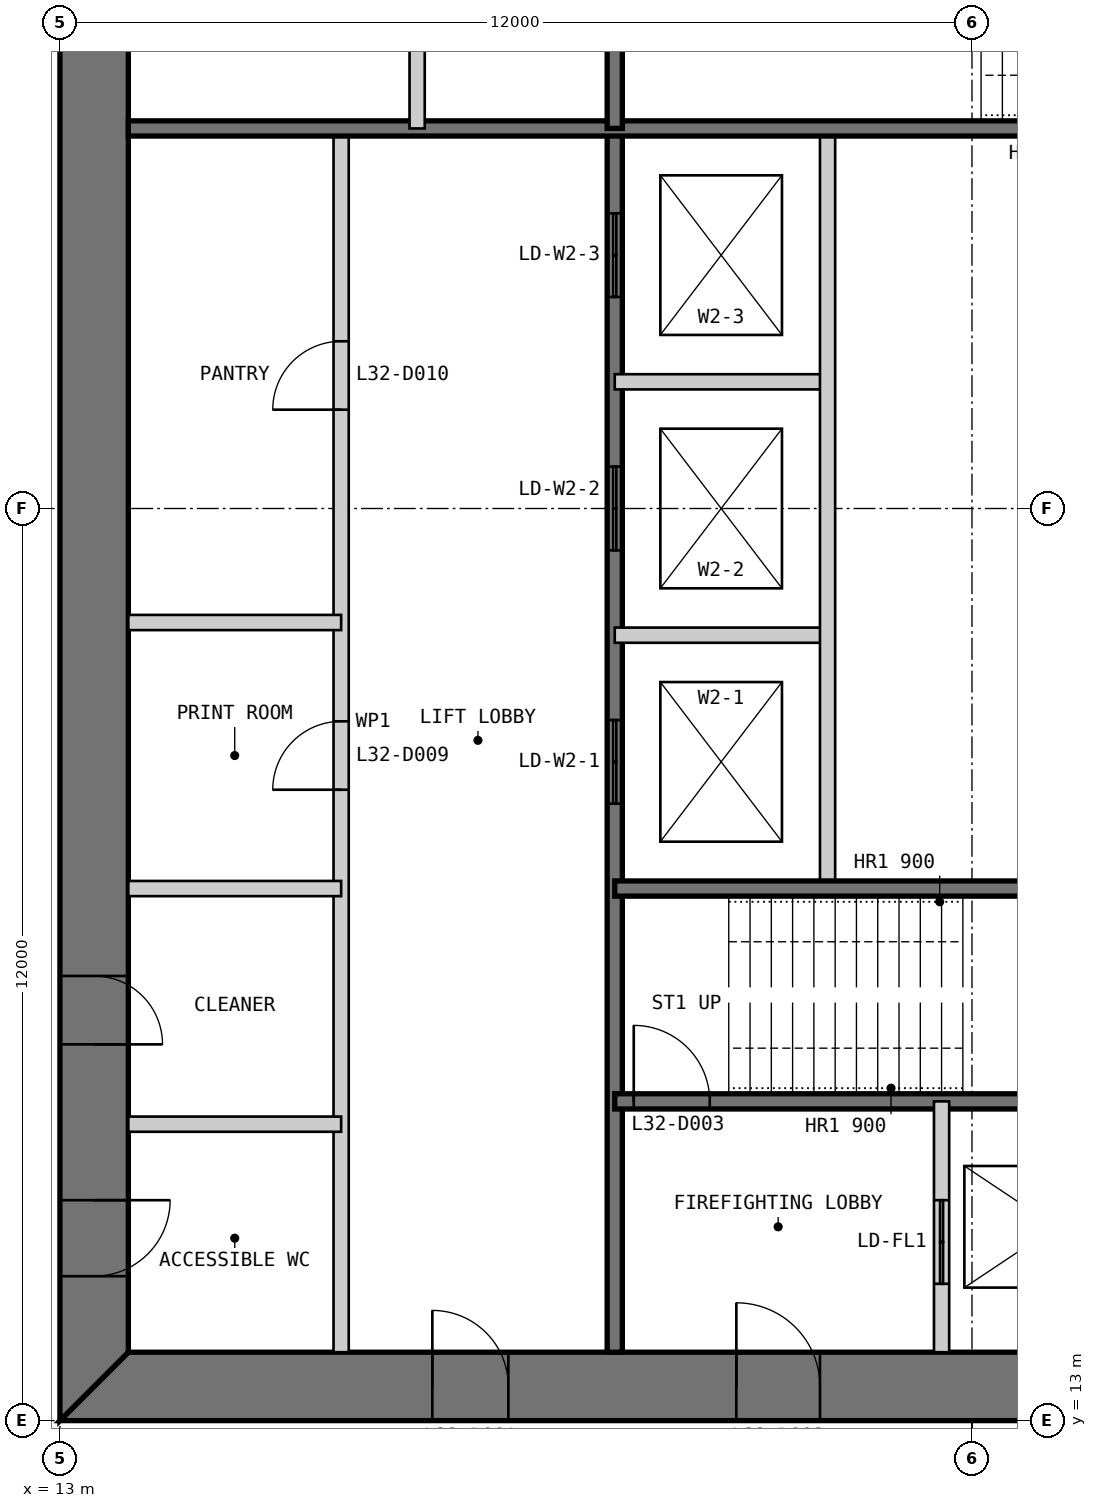
"""IFC4 building model, lengths in metres.
Left out: names, types, materials, properties, quantities, classifications, styles, units other than length and angle.
Written with IfcOpenShell. Run it as: python <this file> out.ifc"""

import sys

from ifc_helpers import new_model, si_unit, direction, frame, frame_2d, origin, place, context, subcontext, project, spatial, polyline, rectangle, outline, extrude, element, fill, save


model = new_model("IFC4")
c1 = context("Model", 3, precision=1e-05, world=origin(), true_north=direction((0.0, 1.0)))
c2 = subcontext(c1, "Body", "Model", "MODEL_VIEW")
j1 = project(units=[si_unit("LENGTHUNIT", "METRE"), si_unit("PLANEANGLEUNIT", "RADIAN")], contexts=[c1])
p1 = place(None, origin())
s1 = spatial("IfcSite", under=j1, at=p1, CompositionType="ELEMENT")
p2 = place(p1, origin())
s2 = spatial("IfcBuilding", under=s1, at=p2, CompositionType="ELEMENT")
p3 = place(p2, frame((0.0, 0.0, 138.4)))
s3 = spatial("IfcBuildingStorey", under=s2, at=p3, CompositionType="ELEMENT", Elevation=138.4)
p4 = place(p3, frame((13.0, 13.45, 0.0), z_axis=(0.0, 0.0, 1.0), x_axis=(1.0, 0.0, 0.0)))
e1 = element("IfcWall", 1, at=p4, inside=s3, PredefinedType="SHEAR", context=c2, shape_type="SweptSolid", body=[
    extrude(outline(polyline([(0.0, -0.45), (24.0, -0.45), (23.1, 0.45), (0.9, 0.45), (0.0, -0.45)])), origin(), (0.0, 0.0, 1.0), 4.0),
])
p5 = place(p4, frame((4.9, 0.0, 0.0)))
e2 = element("IfcOpeningElement", 2, at=p5, cuts=e1, PredefinedType="OPENING", context=c2, shape_type="SweptSolid", body=[
    extrude(rectangle(XDim=1.0, YDim=2.2, at=frame_2d((0.5, 1.1))), frame((0.0, 0.46, 0.0), z_axis=(0.0, -1.0, 0.0), x_axis=(1.0, 0.0, 0.0)), (0.0, 0.0, 1.0), 0.92),
])
p6 = place(p4, frame((8.9, 0.0, 0.0)))
e3 = element("IfcOpeningElement", 3, at=p6, cuts=e1, PredefinedType="OPENING", context=c2, shape_type="SweptSolid", body=[
    extrude(rectangle(XDim=1.1, YDim=2.2, at=frame_2d((0.55, 1.1))), frame((0.0, 0.46, 0.0), z_axis=(0.0, -1.0, 0.0), x_axis=(1.0, 0.0, 0.0)), (0.0, 0.0, 1.0), 0.92),
])
p7 = place(p4, frame((15.05, 0.0, 0.0)))
e4 = element("IfcOpeningElement", 4, at=p7, cuts=e1, PredefinedType="OPENING", context=c2, shape_type="SweptSolid", body=[
    extrude(rectangle(XDim=0.9, YDim=2.2, at=frame_2d((0.45, 1.1))), frame((0.0, 0.46, 0.0), z_axis=(0.0, -1.0, 0.0), x_axis=(1.0, 0.0, 0.0)), (0.0, 0.0, 1.0), 0.92),
])
p8 = place(p4, frame((17.9, 0.0, 0.0)))
e5 = element("IfcOpeningElement", 5, at=p8, cuts=e1, PredefinedType="OPENING", context=c2, shape_type="SweptSolid", body=[
    extrude(rectangle(XDim=1.0, YDim=2.2, at=frame_2d((0.5, 1.1))), frame((0.0, 0.46, 0.0), z_axis=(0.0, -1.0, 0.0), x_axis=(1.0, 0.0, 0.0)), (0.0, 0.0, 1.0), 0.92),
])
p9 = place(p4, frame((21.4, 0.0, 0.0)))
e6 = element("IfcOpeningElement", 6, at=p9, cuts=e1, PredefinedType="OPENING", context=c2, shape_type="SweptSolid", body=[
    extrude(rectangle(XDim=1.0, YDim=2.2, at=frame_2d((0.5, 1.1))), frame((0.0, 0.46, 0.0), z_axis=(0.0, -1.0, 0.0), x_axis=(1.0, 0.0, 0.0)), (0.0, 0.0, 1.0), 0.92),
])
p10 = place(p3, frame((13.45, 36.1, 0.0), z_axis=(0.0, 0.0, 1.0), x_axis=(0.0, -1.0, 0.0)))
e7 = element("IfcWall", 7, at=p10, inside=s3, PredefinedType="SHEAR", context=c2, shape_type="SweptSolid", body=[
    extrude(outline(polyline([(-0.9, -0.45), (23.1, -0.45), (22.2, 0.45), (0.0, 0.45), (-0.9, -0.45)])), origin(), (0.0, 0.0, 1.0), 4.0),
])
p11 = place(p10, frame((20.2, 0.0, 0.0)))
e8 = element("IfcOpeningElement", 8, at=p11, cuts=e7, PredefinedType="OPENING", context=c2, shape_type="SweptSolid", body=[
    extrude(rectangle(XDim=1.0, YDim=2.2, at=frame_2d((0.5, 1.1))), frame((0.0, 0.46, 0.0), z_axis=(0.0, -1.0, 0.0), x_axis=(1.0, 0.0, 0.0)), (0.0, 0.0, 1.0), 0.92),
])
p12 = place(p10, frame((17.25, 0.0, 0.0)))
e9 = element("IfcOpeningElement", 9, at=p12, cuts=e7, PredefinedType="OPENING", context=c2, shape_type="SweptSolid", body=[
    extrude(rectangle(XDim=0.9, YDim=2.2, at=frame_2d((0.45, 1.1))), frame((0.0, 0.46, 0.0), z_axis=(0.0, -1.0, 0.0), x_axis=(1.0, 0.0, 0.0)), (0.0, 0.0, 1.0), 0.92),
])
p13 = place(p3, frame((16.7, 13.9, 0.0), z_axis=(0.0, 0.0, 1.0), x_axis=(0.0, 1.0, 0.0)))
e10 = element("IfcWall", 10, at=p13, inside=s3, PredefinedType="PARTITIONING", context=c2, shape_type="SweptSolid", body=[
    extrude(rectangle(XDim=16.1, YDim=0.2, at=frame_2d((8.05, 0.0))), origin(), (0.0, 0.0, 1.0), 3.8),
])
p14 = place(p13, frame((7.4, 0.0, 0.0)))
e11 = element("IfcOpeningElement", 11, at=p14, cuts=e10, PredefinedType="OPENING", context=c2, shape_type="SweptSolid", body=[
    extrude(rectangle(XDim=0.9, YDim=2.2, at=frame_2d((0.45, 1.1))), frame((0.0, 0.11, 0.0), z_axis=(0.0, -1.0, 0.0), x_axis=(1.0, 0.0, 0.0)), (0.0, 0.0, 1.0), 0.22),
])
p15 = place(p13, frame((12.4, 0.0, 0.0)))
e12 = element("IfcOpeningElement", 12, at=p15, cuts=e10, PredefinedType="OPENING", context=c2, shape_type="SweptSolid", body=[
    extrude(rectangle(XDim=0.9, YDim=2.2, at=frame_2d((0.45, 1.1))), frame((0.0, 0.11, 0.0), z_axis=(0.0, -1.0, 0.0), x_axis=(1.0, 0.0, 0.0)), (0.0, 0.0, 1.0), 0.22),
])
p16 = place(p3, frame((20.3, 13.9, 0.0), z_axis=(0.0, 0.0, 1.0), x_axis=(0.0, 1.0, 0.0)))
e13 = element("IfcWall", 13, at=p16, inside=s3, PredefinedType="SOLIDWALL", context=c2, shape_type="SweptSolid", body=[
    extrude(rectangle(XDim=16.1, YDim=0.2, at=frame_2d((8.05, 0.0))), origin(), (0.0, 0.0, 1.0), 3.8),
])
p17 = place(p16, frame((7.217, 0.0, 0.0)))
e14 = element("IfcOpeningElement", 14, at=p17, cuts=e13, PredefinedType="OPENING", context=c2, shape_type="SweptSolid", body=[
    extrude(rectangle(XDim=1.1, YDim=2.2, at=frame_2d((0.55, 1.1))), frame((0.0, 0.11, 0.0), z_axis=(0.0, -1.0, 0.0), x_axis=(1.0, 0.0, 0.0)), (0.0, 0.0, 1.0), 0.22),
])
p18 = place(p16, frame((10.55, 0.0, 0.0)))
e15 = element("IfcOpeningElement", 15, at=p18, cuts=e13, PredefinedType="OPENING", context=c2, shape_type="SweptSolid", body=[
    extrude(rectangle(XDim=1.1, YDim=2.2, at=frame_2d((0.55, 1.1))), frame((0.0, 0.11, 0.0), z_axis=(0.0, -1.0, 0.0), x_axis=(1.0, 0.0, 0.0)), (0.0, 0.0, 1.0), 0.22),
])
p19 = place(p16, frame((13.883, 0.0, 0.0)))
e16 = element("IfcOpeningElement", 16, at=p19, cuts=e13, PredefinedType="OPENING", context=c2, shape_type="SweptSolid", body=[
    extrude(rectangle(XDim=1.1, YDim=2.2, at=frame_2d((0.55, 1.1))), frame((0.0, 0.11, 0.0), z_axis=(0.0, -1.0, 0.0), x_axis=(1.0, 0.0, 0.0)), (0.0, 0.0, 1.0), 0.22),
])
for number, where, z_axis, x_axis in (
    (17, (20.3, 23.333, 0.0), (0.0, 0.0, 1.0), (1.0, 0.0, 0.0)),
    (18, (20.3, 26.667, 0.0), (0.0, 0.0, 1.0), (1.0, 0.0, 0.0)),
):
    element("IfcWall", number, at=place(p3, frame(where, z_axis=z_axis, x_axis=x_axis)), inside=s3, PredefinedType="PARTITIONING", context=c2, shape_type="SweptSolid", body=[
        extrude(rectangle(XDim=2.8, YDim=0.2, at=frame_2d((1.4, 0.0))), origin(), (0.0, 0.0, 1.0), 3.8),
    ])
p20 = place(p3, frame((23.1, 20.0, 0.0), z_axis=(0.0, 0.0, 1.0), x_axis=(0.0, 1.0, 0.0)))
e19 = element("IfcWall", 19, at=p20, inside=s3, PredefinedType="PARTITIONING", context=c2, shape_type="SweptSolid", body=[
    extrude(rectangle(XDim=10.0, YDim=0.2, at=frame_2d((5.0, 0.0))), origin(), (0.0, 0.0, 1.0), 3.8),
])
p21 = place(p3, frame((20.3, 17.2, 0.0), z_axis=(0.0, 0.0, 1.0), x_axis=(1.0, 0.0, 0.0)))
e20 = element("IfcWall", 20, at=p21, inside=s3, PredefinedType="SOLIDWALL", context=c2, shape_type="SweptSolid", body=[
    extrude(rectangle(XDim=9.4, YDim=0.2, at=frame_2d((4.7, 0.0))), origin(), (0.0, 0.0, 1.0), 3.8),
])
p22 = place(p21, frame((0.25, 0.0, 0.0)))
e21 = element("IfcOpeningElement", 21, at=p22, cuts=e20, PredefinedType="OPENING", context=c2, shape_type="SweptSolid", body=[
    extrude(rectangle(XDim=1.0, YDim=2.2, at=frame_2d((0.5, 1.1))), frame((0.0, 0.11, 0.0), z_axis=(0.0, -1.0, 0.0), x_axis=(1.0, 0.0, 0.0)), (0.0, 0.0, 1.0), 0.22),
])
p23 = place(p3, frame((20.3, 20.0, 0.0), z_axis=(0.0, 0.0, 1.0), x_axis=(1.0, 0.0, 0.0)))
e22 = element("IfcWall", 22, at=p23, inside=s3, PredefinedType="SOLIDWALL", context=c2, shape_type="SweptSolid", body=[
    extrude(rectangle(XDim=15.8, YDim=0.2, at=frame_2d((7.9, 0.0))), origin(), (0.0, 0.0, 1.0), 3.8),
])
p24 = place(p3, frame((24.6, 13.9, 0.0), z_axis=(0.0, 0.0, 1.0), x_axis=(0.0, 1.0, 0.0)))
e23 = element("IfcWall", 23, at=p24, inside=s3, PredefinedType="PARTITIONING", context=c2, shape_type="SweptSolid", body=[
    extrude(rectangle(XDim=3.3, YDim=0.2, at=frame_2d((1.65, 0.0))), origin(), (0.0, 0.0, 1.0), 3.8),
])
p25 = place(p24, frame((0.9, 0.0, 0.0)))
e24 = element("IfcOpeningElement", 24, at=p25, cuts=e23, PredefinedType="OPENING", context=c2, shape_type="SweptSolid", body=[
    extrude(rectangle(XDim=1.1, YDim=2.2, at=frame_2d((0.55, 1.1))), frame((0.0, 0.11, 0.0), z_axis=(0.0, -1.0, 0.0), x_axis=(1.0, 0.0, 0.0)), (0.0, 0.0, 1.0), 0.22),
])
for number, where, z_axis, x_axis in (
    (25, (13.9, 16.9, 0.0), (0.0, 0.0, 1.0), (1.0, 0.0, 0.0)),
    (26, (13.9, 20.0, 0.0), (0.0, 0.0, 1.0), (1.0, 0.0, 0.0)),
    (27, (13.9, 23.5, 0.0), (0.0, 0.0, 1.0), (1.0, 0.0, 0.0)),
):
    element("IfcWall", number, at=place(p3, frame(where, z_axis=z_axis, x_axis=x_axis)), inside=s3, PredefinedType="PARTITIONING", context=c2, shape_type="SweptSolid", body=[
        extrude(rectangle(XDim=2.8, YDim=0.2, at=frame_2d((1.4, 0.0))), origin(), (0.0, 0.0, 1.0), 3.8),
    ])
p26 = place(p3, frame((29.7, 30.0, 0.0), z_axis=(0.0, 0.0, 1.0), x_axis=(-1.0, 0.0, 0.0)))
e28 = element("IfcWall", 28, at=p26, inside=s3, PredefinedType="SOLIDWALL", context=c2, shape_type="SweptSolid", body=[
    extrude(rectangle(XDim=15.8, YDim=0.2, at=frame_2d((7.9, 0.0))), origin(), (0.0, 0.0, 1.0), 3.8),
])
p27 = place(p3, frame((20.3, 36.1, 0.0), z_axis=(0.0, 0.0, 1.0), x_axis=(0.0, -1.0, 0.0)))
e29 = element("IfcWall", 29, at=p27, inside=s3, PredefinedType="SOLIDWALL", context=c2, shape_type="SweptSolid", body=[
    extrude(rectangle(XDim=6.1, YDim=0.2, at=frame_2d((3.05, 0.0))), origin(), (0.0, 0.0, 1.0), 3.8),
])
p28 = place(p3, frame((17.7, 36.1, 0.0), z_axis=(0.0, 0.0, 1.0), x_axis=(0.0, -1.0, 0.0)))
e30 = element("IfcWall", 30, at=p28, inside=s3, PredefinedType="PARTITIONING", context=c2, shape_type="SweptSolid", body=[
    extrude(rectangle(XDim=6.1, YDim=0.2, at=frame_2d((3.05, 0.0))), origin(), (0.0, 0.0, 1.0), 3.8),
])
p29 = place(p5, origin())
e31 = element("IfcDoor", 31, at=p29, inside=s3, OperationType="SINGLE_SWING_LEFT", PredefinedType="DOOR", context=c2, shape_type="SweptSolid", body=[
    extrude(rectangle(XDim=1.0, YDim=2.2, at=frame_2d((0.5, 1.1))), frame((0.0, 0.025, 0.0), z_axis=(0.0, -1.0, 0.0), x_axis=(1.0, 0.0, 0.0)), (0.0, 0.0, 1.0), 0.05),
    extrude(outline(polyline([(0.0, 0.0), (0.04, 0.0), (0.04, 2.16), (0.96, 2.16), (0.96, 0.0), (1.0, 0.0), (1.0, 2.2), (0.0, 2.2), (0.0, 0.0)])), frame((0.0, 0.3, 0.0), z_axis=(0.0, -1.0, 0.0), x_axis=(1.0, 0.0, 0.0)), (0.0, 0.0, 1.0), 0.6),
])
fill(e2, e31)
p30 = place(p6, origin())
e32 = element("IfcDoor", 32, at=p30, inside=s3, OperationType="SINGLE_SWING_LEFT", PredefinedType="DOOR", context=c2, shape_type="SweptSolid", body=[
    extrude(rectangle(XDim=1.1, YDim=2.2, at=frame_2d((0.55, 1.1))), frame((0.0, 0.025, 0.0), z_axis=(0.0, -1.0, 0.0), x_axis=(1.0, 0.0, 0.0)), (0.0, 0.0, 1.0), 0.05),
    extrude(outline(polyline([(0.0, 0.0), (0.04, 0.0), (0.04, 2.16), (1.06, 2.16), (1.06, 0.0), (1.1, 0.0), (1.1, 2.2), (0.0, 2.2), (0.0, 0.0)])), frame((0.0, 0.3, 0.0), z_axis=(0.0, -1.0, 0.0), x_axis=(1.0, 0.0, 0.0)), (0.0, 0.0, 1.0), 0.6),
])
fill(e3, e32)
p31 = place(p22, origin())
e33 = element("IfcDoor", 33, at=p31, inside=s3, OperationType="SINGLE_SWING_LEFT", PredefinedType="DOOR", context=c2, shape_type="SweptSolid", body=[
    extrude(rectangle(XDim=1.0, YDim=2.2, at=frame_2d((0.5, 1.1))), frame((0.0, 0.025, 0.0), z_axis=(0.0, -1.0, 0.0), x_axis=(1.0, 0.0, 0.0)), (0.0, 0.0, 1.0), 0.05),
])
fill(e21, e33)
p32 = place(p11, origin())
e34 = element("IfcDoor", 34, at=p32, inside=s3, OperationType="SINGLE_SWING_LEFT", PredefinedType="DOOR", context=c2, shape_type="SweptSolid", body=[
    extrude(rectangle(XDim=1.0, YDim=2.2, at=frame_2d((0.5, 1.1))), frame((0.0, 0.025, 0.0), z_axis=(0.0, -1.0, 0.0), x_axis=(1.0, 0.0, 0.0)), (0.0, 0.0, 1.0), 0.05),
    extrude(outline(polyline([(0.0, 0.0), (0.04, 0.0), (0.04, 2.16), (0.96, 2.16), (0.96, 0.0), (1.0, 0.0), (1.0, 2.2), (0.0, 2.2), (0.0, 0.0)])), frame((0.0, 0.3, 0.0), z_axis=(0.0, -1.0, 0.0), x_axis=(1.0, 0.0, 0.0)), (0.0, 0.0, 1.0), 0.6),
])
fill(e8, e34)
p33 = place(p12, origin())
e35 = element("IfcDoor", 35, at=p33, inside=s3, OperationType="SINGLE_SWING_RIGHT", PredefinedType="DOOR", context=c2, shape_type="SweptSolid", body=[
    extrude(rectangle(XDim=0.9, YDim=2.2, at=frame_2d((0.45, 1.1))), frame((0.0, 0.025, 0.0), z_axis=(0.0, -1.0, 0.0), x_axis=(1.0, 0.0, 0.0)), (0.0, 0.0, 1.0), 0.05),
    extrude(outline(polyline([(0.0, 0.0), (0.04, 0.0), (0.04, 2.16), (0.86, 2.16), (0.86, 0.0), (0.9, 0.0), (0.9, 2.2), (0.0, 2.2), (0.0, 0.0)])), frame((0.0, 0.3, 0.0), z_axis=(0.0, -1.0, 0.0), x_axis=(1.0, 0.0, 0.0)), (0.0, 0.0, 1.0), 0.6),
])
fill(e9, e35)
p34 = place(p14, origin())
e36 = element("IfcDoor", 36, at=p34, inside=s3, OperationType="SINGLE_SWING_LEFT", PredefinedType="DOOR", context=c2, shape_type="SweptSolid", body=[
    extrude(rectangle(XDim=0.9, YDim=2.2, at=frame_2d((0.45, 1.1))), frame((0.0, 0.025, 0.0), z_axis=(0.0, -1.0, 0.0), x_axis=(1.0, 0.0, 0.0)), (0.0, 0.0, 1.0), 0.05),
])
fill(e11, e36)
p35 = place(p15, origin())
e37 = element("IfcDoor", 37, at=p35, inside=s3, OperationType="SINGLE_SWING_LEFT", PredefinedType="DOOR", context=c2, shape_type="SweptSolid", body=[
    extrude(rectangle(XDim=0.9, YDim=2.2, at=frame_2d((0.45, 1.1))), frame((0.0, 0.025, 0.0), z_axis=(0.0, -1.0, 0.0), x_axis=(1.0, 0.0, 0.0)), (0.0, 0.0, 1.0), 0.05),
])
fill(e12, e37)
p36 = place(p25, origin())
e38 = element("IfcDoor", 38, at=p36, inside=s3, OperationType="DOUBLE_DOOR_SLIDING", PredefinedType="DOOR", context=c2, shape_type="SweptSolid", body=[
    extrude(rectangle(XDim=1.1, YDim=2.2, at=frame_2d((0.55, 1.1))), frame((0.0, 0.025, 0.0), z_axis=(0.0, -1.0, 0.0), x_axis=(1.0, 0.0, 0.0)), (0.0, 0.0, 1.0), 0.05),
])
fill(e24, e38)
p37 = place(p17, origin())
e39 = element("IfcDoor", 39, at=p37, inside=s3, OperationType="DOUBLE_DOOR_SLIDING", PredefinedType="DOOR", context=c2, shape_type="SweptSolid", body=[
    extrude(rectangle(XDim=1.1, YDim=2.2, at=frame_2d((0.55, 1.1))), frame((0.0, 0.025, 0.0), z_axis=(0.0, -1.0, 0.0), x_axis=(1.0, 0.0, 0.0)), (0.0, 0.0, 1.0), 0.05),
])
fill(e14, e39)
p38 = place(p18, origin())
e40 = element("IfcDoor", 40, at=p38, inside=s3, OperationType="DOUBLE_DOOR_SLIDING", PredefinedType="DOOR", context=c2, shape_type="SweptSolid", body=[
    extrude(rectangle(XDim=1.1, YDim=2.2, at=frame_2d((0.55, 1.1))), frame((0.0, 0.025, 0.0), z_axis=(0.0, -1.0, 0.0), x_axis=(1.0, 0.0, 0.0)), (0.0, 0.0, 1.0), 0.05),
])
fill(e15, e40)
p39 = place(p19, origin())
e41 = element("IfcDoor", 41, at=p39, inside=s3, OperationType="DOUBLE_DOOR_SLIDING", PredefinedType="DOOR", context=c2, shape_type="SweptSolid", body=[
    extrude(rectangle(XDim=1.1, YDim=2.2, at=frame_2d((0.55, 1.1))), frame((0.0, 0.025, 0.0), z_axis=(0.0, -1.0, 0.0), x_axis=(1.0, 0.0, 0.0)), (0.0, 0.0, 1.0), 0.05),
])
fill(e16, e41)
save(model, sys.argv[1])
